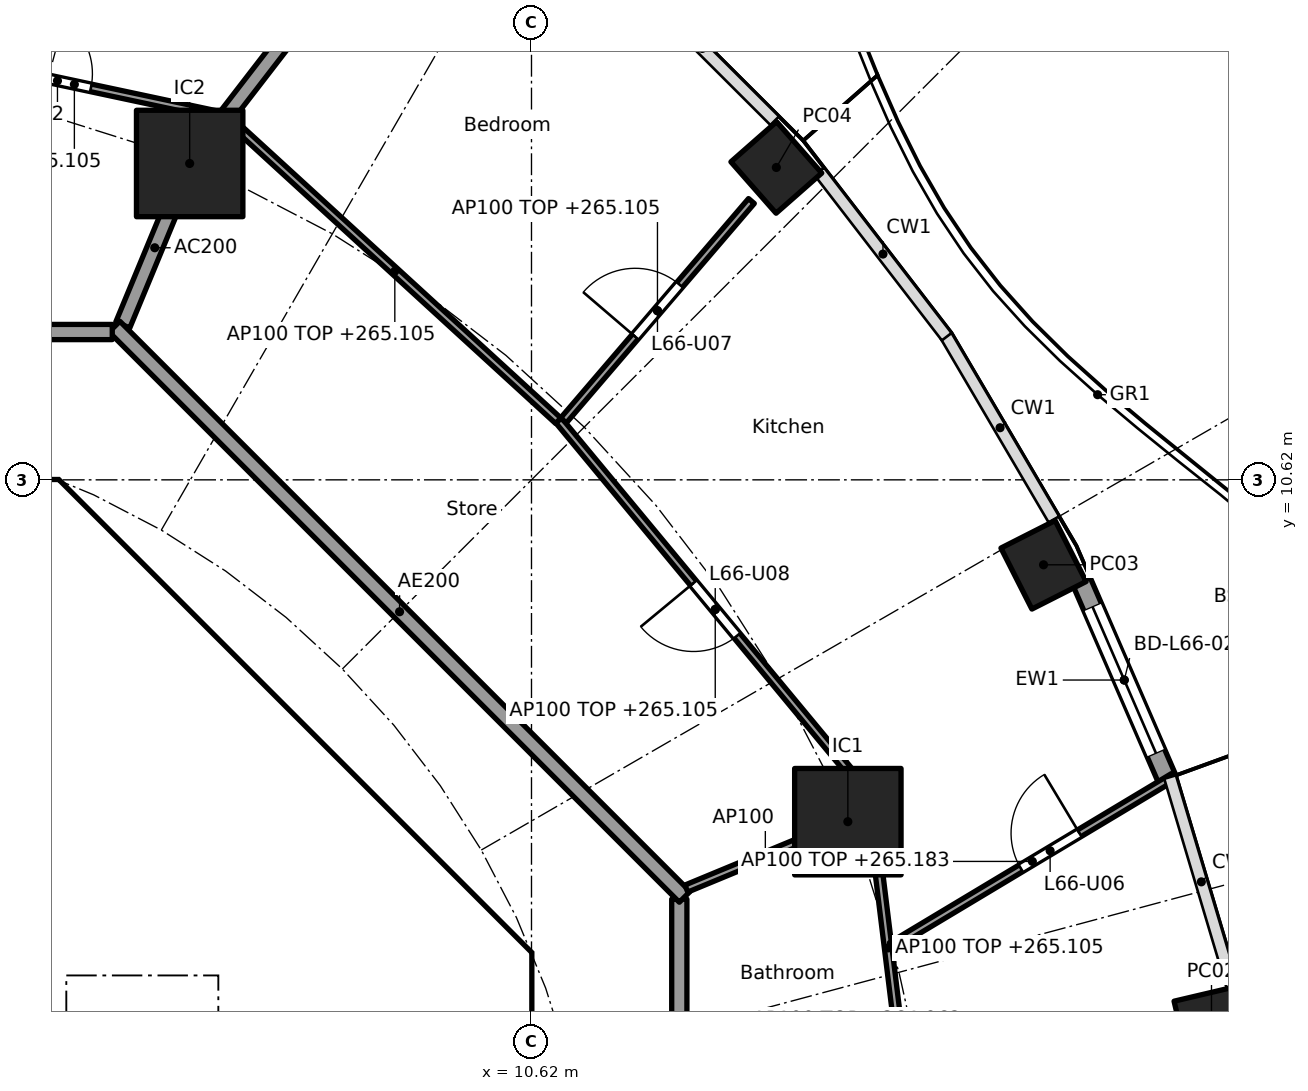
"""IFC4 building model, lengths in metres.
Left out: names, types, materials, properties, quantities, classifications, styles, units other than length and angle.
Written with IfcOpenShell. Run it as: python <this file> out.ifc"""

import sys

from ifc_helpers import new_model, si_unit, direction, frame, frame_2d, origin, origin_2d, place, context, subcontext, project, spatial, polyline, rectangle, hollow_rectangle, outline, extrude, element, fill, save


model = new_model("IFC4")
c1 = context("Model", 3, precision=1e-05, world=origin(), true_north=direction((0.0, 1.0)))
c2 = subcontext(c1, "Body", "Model", "MODEL_VIEW")
j1 = project(units=[si_unit("LENGTHUNIT", "METRE"), si_unit("PLANEANGLEUNIT", "RADIAN")], contexts=[c1])
p1 = place(None, origin())
s1 = spatial("IfcSite", under=j1, at=p1, CompositionType="ELEMENT")
p2 = place(p1, origin())
s2 = spatial("IfcBuilding", under=s1, at=p2, CompositionType="ELEMENT")
p3 = place(p2, frame((0.0, 0.0, 262.2)))
s3 = spatial("IfcBuildingStorey", under=s2, at=p3, CompositionType="ELEMENT", Elevation=262.2)
for number, where, z_axis, x_axis in (
    (1, (19.566, 3.415, 0.0), (0.0, 0.0, 1.0), (-0.229, 0.973, 0.0)),
    (2, (17.356, 9.502, 0.0), (0.0, 0.0, 1.0), (-0.452, 0.892, 0.0)),
    (3, (13.841, 14.73, 0.0), (0.0, 0.0, 1.0), (-0.66, 0.751, 0.0)),
):
    element("IfcColumn", number, at=place(p3, frame(where, z_axis=z_axis, x_axis=x_axis)), inside=s3, PredefinedType="COLUMN", context=c2, shape_type="SweptSolid", body=[
        extrude(hollow_rectangle(XDim=0.9, YDim=0.8, WallThickness=0.028, at=origin_2d()), origin(), (0.0, 0.0, 1.0), 3.7),
    ])
for number, where, z_axis, x_axis in (
    (4, (14.782, 6.123, 0.0), (0.0, 0.0, 1.0), (1.0, 0.0, 0.0)),
    (5, (6.123, 14.782, 0.0), (0.0, 0.0, 1.0), (1.0, 0.0, 0.0)),
):
    element("IfcColumn", number, at=place(p3, frame(where, z_axis=z_axis, x_axis=x_axis)), inside=s3, PredefinedType="COLUMN", context=c2, shape_type="SweptSolid", body=[
        extrude(rectangle(XDim=1.4, YDim=1.4, at=origin_2d()), origin(), (0.0, 0.0, 1.0), 3.7),
    ])
p4 = place(p3, frame((17.854, 9.29, 0.0), z_axis=(0.0, 0.0, 1.0), x_axis=(0.397597791596, -0.9175598052, 0.0)))
e6 = element("IfcWall", 6, at=p4, inside=s3, PredefinedType="SOLIDWALL", context=c2, shape_type="SweptSolid", body=[
    extrude(rectangle(XDim=2.841, YDim=0.25, at=frame_2d((1.42, 0.0))), origin(), (0.0, 0.0, 1.0), 3.44),
])
p5 = place(p4, frame((0.371, 0.0, 0.0)))
e7 = element("IfcOpeningElement", 7, at=p5, cuts=e6, PredefinedType="OPENING", context=c2, shape_type="SweptSolid", body=[
    extrude(rectangle(XDim=2.1, YDim=2.4, at=frame_2d((1.05, 1.2))), frame((0.0, 0.135, 0.0), z_axis=(0.0, -1.0, 0.0), x_axis=(1.0, 0.0, 0.0)), (0.0, 0.0, 1.0), 0.27),
])
p6 = place(p3, frame((9.988, 4.613, 0.0), z_axis=(0.0, 0.0, 1.0), x_axis=(-0.707106781187, 0.707106781187, 0.0)))
e8 = element("IfcWall", 8, at=p6, inside=s3, PredefinedType="SHEAR", context=c2, shape_type="SweptSolid", body=[
    extrude(rectangle(XDim=7.602, YDim=0.6, at=frame_2d((3.801, 0.0))), origin(), (0.0, 0.0, 1.0), 3.44),
])
p7 = place(p6, frame((3.201, 0.0, 0.0)))
e9 = element("IfcOpeningElement", 9, at=p7, cuts=e8, PredefinedType="OPENING", context=c2, shape_type="SweptSolid", body=[
    extrude(rectangle(XDim=1.2, YDim=2.1, at=frame_2d((0.6, 1.05))), frame((0.0, 0.31, 0.0), z_axis=(0.0, -1.0, 0.0), x_axis=(1.0, 0.0, 0.0)), (0.0, 0.0, 1.0), 0.62),
])
p8 = place(p3, frame((6.7, 4.0, 0.0), z_axis=(0.0, 0.0, 1.0), x_axis=(1.0, 0.0, 0.0)))
e10 = element("IfcWall", 10, at=p8, inside=s3, PredefinedType="SOLIDWALL", context=c2, shape_type="SweptSolid", body=[
    extrude(rectangle(XDim=3.325, YDim=0.2, at=frame_2d((1.662, 0.0))), origin(), (0.0, 0.0, 1.0), 3.44),
])
p9 = place(p8, frame((1.25, 0.0, 0.0)))
e11 = element("IfcOpeningElement", 11, at=p9, cuts=e10, PredefinedType="OPENING", context=c2, shape_type="SweptSolid", body=[
    extrude(rectangle(XDim=1.1, YDim=2.1, at=frame_2d((0.55, 1.05))), frame((0.0, 0.11, 0.0), z_axis=(0.0, -1.0, 0.0), x_axis=(1.0, 0.0, 0.0)), (0.0, 0.0, 1.0), 0.22),
])
p10 = place(p3, origin())
e12 = element("IfcWall", 12, at=p10, inside=s3, PredefinedType="SHEAR", context=c2, shape_type="SweptSolid", body=[
    extrude(outline(polyline([(-4.152, 10.025), (-4.401, 9.776), (-4.825, 10.2), (-4.401, 10.625), (4.401, 10.625), (4.825, 10.2), (4.401, 9.776), (4.152, 10.025), (-4.152, 10.025)])), origin(), (0.0, 0.0, 1.0), 3.44),
])
p11 = place(p3, origin())
e13 = element("IfcWall", 13, at=p11, inside=s3, PredefinedType="SHEAR", context=c2, shape_type="SweptSolid", body=[
    extrude(outline(polyline([(9.776, -4.401), (10.025, -4.152), (10.025, -3.801), (10.025, 4.152), (9.776, 4.401), (10.2, 4.825), (10.625, 4.401), (10.625, -4.401), (10.2, -4.825), (9.776, -4.401)])), origin(), (0.0, 0.0, 1.0), 3.44),
])
p12 = place(p3, origin())
e14 = element("IfcWall", 14, at=p12, inside=s3, PredefinedType="SOLIDWALL", context=c2, shape_type="SweptSolid", body=[
    extrude(outline(polyline([(-6.7, 4.3), (6.7, 4.3), (6.7, 2.1), (6.5, 2.1), (6.5, 4.1), (4.5, 4.1), (4.5, 2.1), (4.3, 2.1), (4.3, 4.1), (0.1, 4.1), (0.1, 2.1), (-0.1, 2.1), (-0.1, 4.1), (-6.5, 4.1), (-6.5, 2.1), (-6.7, 2.1), (-6.7, 4.3)])), origin(), (0.0, 0.0, 1.0), 3.44),
])
p13 = place(p3, origin())
e15 = element("IfcWall", 15, at=p13, inside=s3, PredefinedType="SOLIDWALL", context=c2, shape_type="SweptSolid", body=[
    extrude(outline(polyline([(7.025, -3.9), (6.7, -3.9), (6.7, 3.9), (7.025, 3.9), (7.025, -3.9)])), origin(), (0.0, 0.0, 1.0), 3.44),
])
p14 = place(p3, frame((5.243, 12.657, 0.0), z_axis=(0.0, 0.0, 1.0), x_axis=(0.382691608661, 0.923876145736, 0.0)))
e16 = element("IfcWall", 16, at=p14, inside=s3, PredefinedType="PARTITIONING", context=c2, shape_type="SweptSolid", body=[
    extrude(rectangle(XDim=2.2, YDim=0.2, at=frame_2d((1.1, 0.0))), origin(), (0.0, 0.0, 1.0), 3.44),
])
p15 = place(p3, frame((6.154, 14.822, 0.0), z_axis=(0.0, 0.0, 1.0), x_axis=(0.610687612043, 0.791871606068, 0.0)))
e17 = element("IfcWall", 17, at=p15, inside=s3, PredefinedType="PARTITIONING", context=c2, shape_type="SweptSolid", body=[
    extrude(rectangle(XDim=4.455, YDim=0.2, at=frame_2d((2.228, 0.0))), origin(), (0.0, 0.0, 1.0), 2.905),
])
p16 = place(p3, frame((12.565, -5.104, 0.0), z_axis=(0.0, 0.0, 1.0), x_axis=(0.0, 1.0, 0.0)))
e18 = element("IfcWall", 18, at=p16, inside=s3, PredefinedType="PARTITIONING", context=c2, shape_type="SweptSolid", body=[
    extrude(rectangle(XDim=10.209, YDim=0.2, at=frame_2d((5.104, 0.0))), origin(), (0.0, 0.0, 1.0), 3.44),
])
p17 = place(p16, frame((4.604, 0.0, 0.0)))
e19 = element("IfcOpeningElement", 19, at=p17, cuts=e18, PredefinedType="OPENING", context=c2, shape_type="SweptSolid", body=[
    extrude(rectangle(XDim=1.0, YDim=2.1, at=frame_2d((0.5, 1.05))), frame((0.0, 0.11, 0.0), z_axis=(0.0, -1.0, 0.0), x_axis=(1.0, 0.0, 0.0)), (0.0, 0.0, 1.0), 0.22),
])
p18 = place(p3, frame((12.635, 5.134, 0.0), z_axis=(0.0, 0.0, 1.0), x_axis=(-0.707106781187, 0.707106781187, 0.0)))
e20 = element("IfcWall", 20, at=p18, inside=s3, PredefinedType="PARTITIONING", context=c2, shape_type="SweptSolid", body=[
    extrude(rectangle(XDim=10.609, YDim=0.2, at=frame_2d((5.305, 0.0))), origin(), (0.0, 0.0, 1.0), 3.44),
])
p19 = place(p3, frame((5.104, 12.565, 0.0), z_axis=(0.0, 0.0, 1.0), x_axis=(-1.0, 0.0, 0.0)))
e21 = element("IfcWall", 21, at=p19, inside=s3, PredefinedType="PARTITIONING", context=c2, shape_type="SweptSolid", body=[
    extrude(rectangle(XDim=10.409, YDim=0.2, at=frame_2d((5.205, 0.0))), origin(), (0.0, 0.0, 1.0), 3.44),
])
p20 = place(p19, frame((6.339, 0.0, 0.0)))
e22 = element("IfcOpeningElement", 22, at=p20, cuts=e21, PredefinedType="OPENING", context=c2, shape_type="SweptSolid", body=[
    extrude(rectangle(XDim=1.0, YDim=2.1, at=frame_2d((0.5, 1.05))), frame((0.0, 0.11, 0.0), z_axis=(0.0, -1.0, 0.0), x_axis=(1.0, 0.0, 0.0)), (0.0, 0.0, 1.0), 0.22),
])
p21 = place(p3, frame((15.552, 2.508, 0.0), z_axis=(0.0, 0.0, 1.0), x_axis=(-0.12196631785, 0.992534239868, 0.0)))
e23 = element("IfcWall", 23, at=p21, inside=s3, PredefinedType="PARTITIONING", context=c2, shape_type="SweptSolid", body=[
    extrude(rectangle(XDim=3.937, YDim=0.1, at=frame_2d((1.969, 0.0))), origin(), (0.0, 0.0, 1.0), 2.905),
])
p22 = place(p3, frame((15.355, 4.488, 0.0), z_axis=(0.0, 0.0, 1.0), x_axis=(0.85763237524, 0.514263268123, 0.0)))
e24 = element("IfcWall", 24, at=p22, inside=s3, PredefinedType="PARTITIONING", context=c2, shape_type="SweptSolid", body=[
    extrude(rectangle(XDim=4.324, YDim=0.1, at=frame_2d((2.162, 0.0))), origin(), (0.0, 0.0, 1.0), 2.983),
])
p23 = place(p22, frame((1.985, 0.0, 0.0)))
e25 = element("IfcOpeningElement", 25, at=p23, cuts=e24, PredefinedType="OPENING", context=c2, shape_type="SweptSolid", body=[
    extrude(rectangle(XDim=0.9, YDim=2.1, at=frame_2d((0.45, 1.05))), frame((0.0, 0.06, 0.0), z_axis=(0.0, -1.0, 0.0), x_axis=(1.0, 0.0, 0.0)), (0.0, 0.0, 1.0), 0.12),
])
p24 = place(p3, frame((12.657, 5.243, 0.0), z_axis=(0.0, 0.0, 1.0), x_axis=(0.923864733477, 0.382719158442, 0.0)))
e26 = element("IfcWall", 26, at=p24, inside=s3, PredefinedType="PARTITIONING", context=c2, shape_type="SweptSolid", body=[
    extrude(rectangle(XDim=2.25, YDim=0.1, at=frame_2d((1.125, 0.0))), origin(), (0.0, 0.0, 1.0), 3.44),
])
p25 = place(p3, frame((15.098, 6.427, 0.0), z_axis=(0.0, 0.0, 1.0), x_axis=(-0.637936555536, 0.770088924158, 0.0)))
e27 = element("IfcWall", 27, at=p25, inside=s3, PredefinedType="PARTITIONING", context=c2, shape_type="SweptSolid", body=[
    extrude(rectangle(XDim=6.46, YDim=0.1, at=frame_2d((3.23, 0.0))), origin(), (0.0, 0.0, 1.0), 2.905),
])
p26 = place(p25, frame((2.78, 0.0, 0.0)))
e28 = element("IfcOpeningElement", 28, at=p26, cuts=e27, PredefinedType="OPENING", context=c2, shape_type="SweptSolid", body=[
    extrude(rectangle(XDim=0.9, YDim=2.1, at=frame_2d((0.45, 1.05))), frame((0.0, 0.06, 0.0), z_axis=(0.0, -1.0, 0.0), x_axis=(1.0, 0.0, 0.0)), (0.0, 0.0, 1.0), 0.12),
])
p27 = place(p3, frame((11.041, 11.402, 0.0), z_axis=(0.0, 0.0, 1.0), x_axis=(0.650558544325, 0.759456108282, 0.0)))
e29 = element("IfcWall", 29, at=p27, inside=s3, PredefinedType="PARTITIONING", context=c2, shape_type="SweptSolid", body=[
    extrude(rectangle(XDim=3.8, YDim=0.1, at=frame_2d((1.9, 0.0))), origin(), (0.0, 0.0, 1.0), 2.905),
])
p28 = place(p27, frame((1.45, 0.0, 0.0)))
e30 = element("IfcOpeningElement", 30, at=p28, cuts=e29, PredefinedType="OPENING", context=c2, shape_type="SweptSolid", body=[
    extrude(rectangle(XDim=0.9, YDim=2.1, at=frame_2d((0.45, 1.05))), frame((0.0, 0.06, 0.0), z_axis=(0.0, -1.0, 0.0), x_axis=(1.0, 0.0, 0.0)), (0.0, 0.0, 1.0), 0.12),
])
p29 = place(p3, frame((10.972, 11.398, 0.0), z_axis=(0.0, 0.0, 1.0), x_axis=(-0.737830272434, 0.674986288069, 0.0)))
e31 = element("IfcWall", 31, at=p29, inside=s3, PredefinedType="PARTITIONING", context=c2, shape_type="SweptSolid", body=[
    extrude(rectangle(XDim=5.827, YDim=0.1, at=frame_2d((2.914, 0.0))), origin(), (0.0, 0.0, 1.0), 2.905),
])
p30 = place(p3, frame((6.5, 15.419, 0.0), z_axis=(0.0, 0.0, 1.0), x_axis=(-0.978053492557, 0.208353943321, 0.0)))
e32 = element("IfcWall", 32, at=p30, inside=s3, PredefinedType="PARTITIONING", context=c2, shape_type="SweptSolid", body=[
    extrude(rectangle(XDim=3.874, YDim=0.1, at=frame_2d((1.937, 0.0))), origin(), (0.0, 0.0, 1.0), 2.905),
])
p31 = place(p30, frame((1.714, 0.0, 0.0)))
e33 = element("IfcOpeningElement", 33, at=p31, cuts=e32, PredefinedType="OPENING", context=c2, shape_type="SweptSolid", body=[
    extrude(rectangle(XDim=0.9, YDim=2.1, at=frame_2d((0.45, 1.05))), frame((0.0, 0.06, 0.0), z_axis=(0.0, -1.0, 0.0), x_axis=(1.0, 0.0, 0.0)), (0.0, 0.0, 1.0), 0.12),
])
p32 = place(p5, origin())
e34 = element("IfcDoor", 34, at=p32, inside=s3, OperationType="SLIDING_TO_LEFT", PredefinedType="DOOR", context=c2, shape_type="SweptSolid", body=[
    extrude(rectangle(XDim=2.1, YDim=2.4, at=frame_2d((1.05, 1.2))), frame((0.0, 0.025, 0.0), z_axis=(0.0, -1.0, 0.0), x_axis=(1.0, 0.0, 0.0)), (0.0, 0.0, 1.0), 0.05),
])
fill(e7, e34)
p33 = place(p9, frame((1.1, 0.0, 0.0), x_axis=(-1.0, 0.0, 0.0)))
e35 = element("IfcDoor", 35, at=p33, inside=s3, OperationType="SINGLE_SWING_LEFT", PredefinedType="DOOR", context=c2, shape_type="SweptSolid", body=[
    extrude(rectangle(XDim=1.1, YDim=2.1, at=frame_2d((0.55, 1.05))), frame((0.0, 0.025, 0.0), z_axis=(0.0, -1.0, 0.0), x_axis=(1.0, 0.0, 0.0)), (0.0, 0.0, 1.0), 0.05),
])
fill(e11, e35)
p34 = place(p7, origin())
e36 = element("IfcDoor", 36, at=p34, inside=s3, OperationType="SINGLE_SWING_RIGHT", PredefinedType="DOOR", context=c2, shape_type="SweptSolid", body=[
    extrude(rectangle(XDim=1.2, YDim=2.1, at=frame_2d((0.6, 1.05))), frame((0.0, 0.025, 0.0), z_axis=(0.0, -1.0, 0.0), x_axis=(1.0, 0.0, 0.0)), (0.0, 0.0, 1.0), 0.05),
])
fill(e9, e36)
p35 = place(p23, origin())
e37 = element("IfcDoor", 37, at=p35, inside=s3, OperationType="SINGLE_SWING_RIGHT", PredefinedType="DOOR", context=c2, shape_type="SweptSolid", body=[
    extrude(rectangle(XDim=0.9, YDim=2.1, at=frame_2d((0.45, 1.05))), frame((0.0, 0.025, 0.0), z_axis=(0.0, -1.0, 0.0), x_axis=(1.0, 0.0, 0.0)), (0.0, 0.0, 1.0), 0.05),
])
fill(e25, e37)
p36 = place(p28, origin())
e38 = element("IfcDoor", 38, at=p36, inside=s3, OperationType="SINGLE_SWING_LEFT", PredefinedType="DOOR", context=c2, shape_type="SweptSolid", body=[
    extrude(rectangle(XDim=0.9, YDim=2.1, at=frame_2d((0.45, 1.05))), frame((0.0, 0.025, 0.0), z_axis=(0.0, -1.0, 0.0), x_axis=(1.0, 0.0, 0.0)), (0.0, 0.0, 1.0), 0.05),
])
fill(e30, e38)
p37 = place(p26, origin())
e39 = element("IfcDoor", 39, at=p37, inside=s3, OperationType="SINGLE_SWING_RIGHT", PredefinedType="DOOR", context=c2, shape_type="SweptSolid", body=[
    extrude(rectangle(XDim=0.9, YDim=2.1, at=frame_2d((0.45, 1.05))), frame((0.0, 0.025, 0.0), z_axis=(0.0, -1.0, 0.0), x_axis=(1.0, 0.0, 0.0)), (0.0, 0.0, 1.0), 0.05),
])
fill(e28, e39)
p38 = place(p31, frame((0.9, 0.0, 0.0), x_axis=(-1.0, 0.0, 0.0)))
e40 = element("IfcDoor", 40, at=p38, inside=s3, OperationType="SINGLE_SWING_LEFT", PredefinedType="DOOR", context=c2, shape_type="SweptSolid", body=[
    extrude(rectangle(XDim=0.9, YDim=2.1, at=frame_2d((0.45, 1.05))), frame((0.0, 0.025, 0.0), z_axis=(0.0, -1.0, 0.0), x_axis=(1.0, 0.0, 0.0)), (0.0, 0.0, 1.0), 0.05),
])
fill(e33, e40)
save(model, sys.argv[1])
